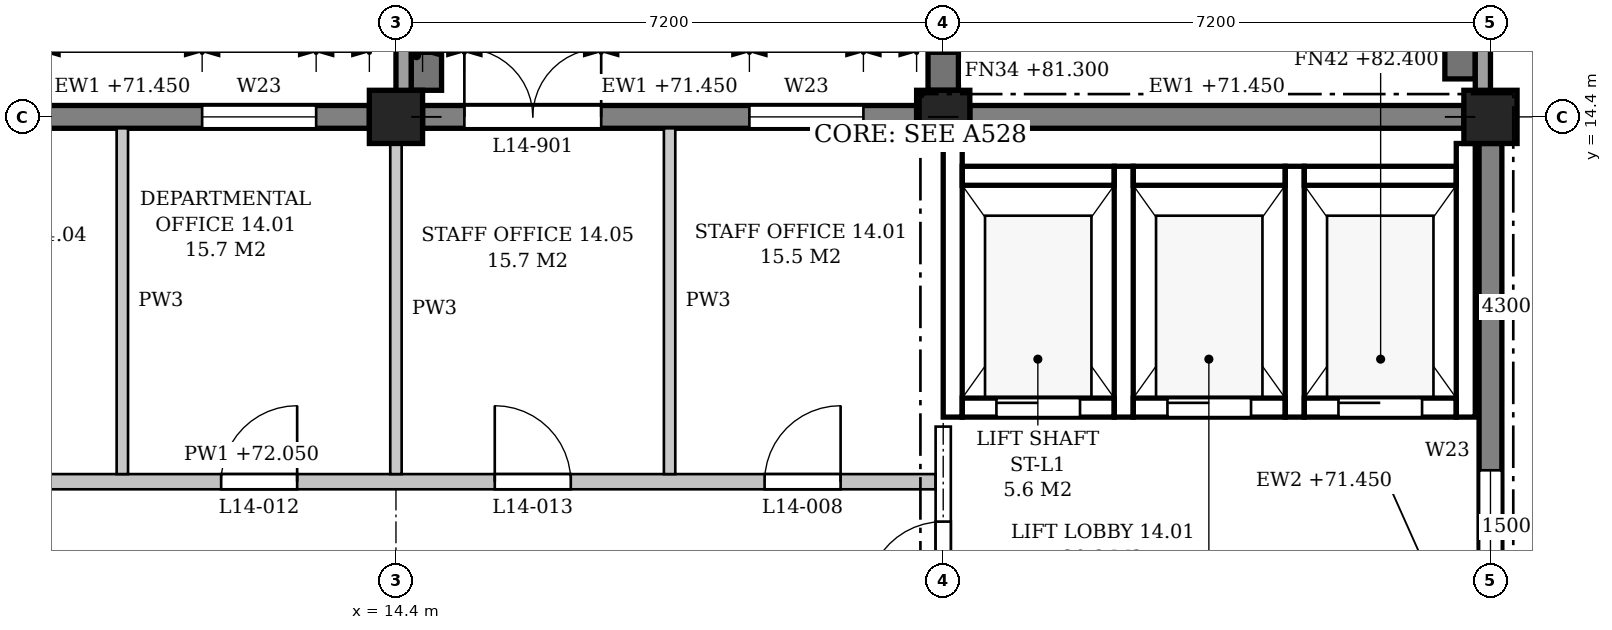
"""IFC4 building model, lengths in metres.
Left out: names, types, materials, properties, quantities, classifications, styles, units other than length and angle.
Written with IfcOpenShell. Run it as: python <this file> out.ifc"""

import sys

from ifc_helpers import new_model, si_unit, direction, frame, frame_2d, origin, origin_2d, place, context, subcontext, project, spatial, polyline, rectangle, outline, extrude, element, fill, save


model = new_model("IFC4")
c1 = context("Model", 3, precision=1e-05, world=origin(), true_north=direction((0.0, 1.0)))
c2 = subcontext(c1, "Body", "Model", "MODEL_VIEW")
j1 = project(units=[si_unit("LENGTHUNIT", "METRE"), si_unit("PLANEANGLEUNIT", "RADIAN")], contexts=[c1])
p1 = place(None, origin())
s1 = spatial("IfcSite", under=j1, at=p1, CompositionType="ELEMENT")
p2 = place(p1, origin())
s2 = spatial("IfcBuilding", under=s1, at=p2, CompositionType="ELEMENT")
p3 = place(p2, frame((0.0, 0.0, 67.8)))
s3 = spatial("IfcBuildingStorey", under=s2, at=p3, CompositionType="ELEMENT", Elevation=67.8)
for number, where, z_axis, x_axis in (
    (1, (14.4, 14.4, 0.0), (0.0, 0.0, 1.0), (1.0, 0.0, 0.0)),
    (2, (21.6, 14.4, 0.0), (0.0, 0.0, 1.0), (1.0, 0.0, 0.0)),
    (3, (28.8, 14.4, 0.0), (0.0, 0.0, 1.0), (1.0, 0.0, 0.0)),
):
    element("IfcColumn", number, at=place(p3, frame(where, z_axis=z_axis, x_axis=x_axis)), inside=s3, PredefinedType="COLUMN", context=c2, shape_type="SweptSolid", body=[
        extrude(rectangle(XDim=0.7, YDim=0.7, at=origin_2d()), origin(), (0.0, 0.0, 1.0), 4.5),
    ])
for number, where, z_axis, x_axis in (
    (4, (14.5, 14.55, 0.0), (0.0, 0.0, 1.0), (0.0, 1.0, 0.0)),
    (5, (28.7, 14.55, 0.0), (0.0, 0.0, 1.0), (0.0, 1.0, 0.0)),
):
    element("IfcWall", number, at=place(p3, frame(where, z_axis=z_axis, x_axis=x_axis)), inside=s3, PredefinedType="STANDARD", context=c2, shape_type="SweptSolid", body=[
        extrude(rectangle(XDim=7.05, YDim=0.2, at=frame_2d((3.525, 0.0))), origin(), (0.0, 0.0, 1.0), 0.15),
    ])
p4 = place(p3, frame((28.8, 7.55, 0.0), z_axis=(0.0, 0.0, 1.0), x_axis=(0.0, 1.0, 0.0)))
e6 = element("IfcWall", 6, at=p4, inside=s3, PredefinedType="STANDARD", context=c2, shape_type="SweptSolid", body=[
    extrude(rectangle(XDim=6.5, YDim=0.3, at=frame_2d((3.25, 0.0))), origin(), (0.0, 0.0, 1.0), 3.65),
])
p5 = place(p4, frame((0.7, 0.0, 0.9)))
e7 = element("IfcOpeningElement", 7, at=p5, cuts=e6, PredefinedType="OPENING", context=c2, shape_type="SweptSolid", body=[
    extrude(outline(polyline([(0.0, 0.0), (1.5, 0.0), (1.5, 1.95), (0.75, 2.7), (0.0, 1.95), (0.0, 0.0)])), frame((0.0, 0.16, 0.0), z_axis=(0.0, -1.0, 0.0), x_axis=(1.0, 0.0, 0.0)), (0.0, 0.0, 1.0), 0.32),
])
p6 = place(p3, frame((28.45, 14.4, 0.0), z_axis=(0.0, 0.0, 1.0), x_axis=(-1.0, 0.0, 0.0)))
e8 = element("IfcWall", 8, at=p6, inside=s3, PredefinedType="STANDARD", context=c2, shape_type="SweptSolid", body=[
    extrude(rectangle(XDim=6.5, YDim=0.3, at=frame_2d((3.25, 0.0))), origin(), (0.0, 0.0, 1.0), 3.65),
])
p7 = place(p3, frame((21.25, 14.4, 0.0), z_axis=(0.0, 0.0, 1.0), x_axis=(-1.0, 0.0, 0.0)))
e9 = element("IfcWall", 9, at=p7, inside=s3, PredefinedType="STANDARD", context=c2, shape_type="SweptSolid", body=[
    extrude(rectangle(XDim=6.5, YDim=0.3, at=frame_2d((3.25, 0.0))), origin(), (0.0, 0.0, 1.0), 3.65),
])
p8 = place(p7, frame((4.15, 0.0, 0.0)))
e10 = element("IfcOpeningElement", 10, at=p8, cuts=e9, PredefinedType="OPENING", context=c2, shape_type="SweptSolid", body=[
    extrude(rectangle(XDim=1.8, YDim=2.4, at=frame_2d((0.9, 1.2))), frame((0.0, 0.16, 0.0), z_axis=(0.0, -1.0, 0.0), x_axis=(1.0, 0.0, 0.0)), (0.0, 0.0, 1.0), 0.32),
])
p9 = place(p7, frame((0.7, 0.0, 0.9)))
e11 = element("IfcOpeningElement", 11, at=p9, cuts=e9, PredefinedType="OPENING", context=c2, shape_type="SweptSolid", body=[
    extrude(outline(polyline([(0.0, 0.0), (1.5, 0.0), (1.5, 1.95), (0.75, 2.7), (0.0, 1.95), (0.0, 0.0)])), frame((0.0, 0.16, 0.0), z_axis=(0.0, -1.0, 0.0), x_axis=(1.0, 0.0, 0.0)), (0.0, 0.0, 1.0), 0.32),
])
p10 = place(p3, frame((14.05, 14.4, 0.0), z_axis=(0.0, 0.0, 1.0), x_axis=(-1.0, 0.0, 0.0)))
e12 = element("IfcWall", 12, at=p10, inside=s3, PredefinedType="STANDARD", context=c2, shape_type="SweptSolid", body=[
    extrude(rectangle(XDim=6.5, YDim=0.3, at=frame_2d((3.25, 0.0))), origin(), (0.0, 0.0, 1.0), 3.65),
])
p11 = place(p10, frame((0.7, 0.0, 0.9)))
e13 = element("IfcOpeningElement", 13, at=p11, cuts=e12, PredefinedType="OPENING", context=c2, shape_type="SweptSolid", body=[
    extrude(outline(polyline([(0.0, 0.0), (1.5, 0.0), (1.5, 1.95), (0.75, 2.7), (0.0, 1.95), (0.0, 0.0)])), frame((0.0, 0.16, 0.0), z_axis=(0.0, -1.0, 0.0), x_axis=(1.0, 0.0, 0.0)), (0.0, 0.0, 1.0), 0.32),
])
p12 = place(p10, frame((4.3, 0.0, 0.9)))
e14 = element("IfcOpeningElement", 14, at=p12, cuts=e12, PredefinedType="OPENING", context=c2, shape_type="SweptSolid", body=[
    extrude(outline(polyline([(0.0, 0.0), (1.5, 0.0), (1.5, 1.95), (0.75, 2.7), (0.0, 1.95), (0.0, 0.0)])), frame((0.0, 0.16, 0.0), z_axis=(0.0, -1.0, 0.0), x_axis=(1.0, 0.0, 0.0)), (0.0, 0.0, 1.0), 0.32),
])
for number, where, z_axis, x_axis in (
    (15, (14.8, 14.75, 0.0), (0.0, 0.0, 1.0), (0.0, 1.0, 0.0)),
    (16, (21.6, 14.75, 0.0), (0.0, 0.0, 1.0), (0.0, 1.0, 0.0)),
):
    element("IfcWall", number, at=place(p3, frame(where, z_axis=z_axis, x_axis=x_axis)), inside=s3, PredefinedType="POLYGONAL", context=c2, shape_type="SweptSolid", body=[
        extrude(outline(polyline([(0.5, 0.0), (0.5, 12.975), (0.15, 13.5), (0.0, 13.5), (0.0, 0.0), (0.5, 0.0)])), frame((0.0, 0.2, 0.0), z_axis=(0.0, -1.0, 0.0), x_axis=(1.0, 0.0, 0.0)), (0.0, 0.0, 1.0), 0.4),
    ])
p13 = place(p3, frame((28.4, 14.9, 0.0), z_axis=(0.0, 0.0, 1.0), x_axis=(0.0, 1.0, 0.0)))
e17 = element("IfcWall", 17, at=p13, inside=s3, PredefinedType="POLYGONAL", context=c2, shape_type="SweptSolid", body=[
    extrude(outline(polyline([(0.5, 0.0), (0.5, 14.6), (0.0, 14.6), (0.0, 0.0), (0.5, 0.0)])), frame((0.0, 0.2, 0.0), z_axis=(0.0, -1.0, 0.0), x_axis=(1.0, 0.0, 0.0)), (0.0, 0.0, 1.0), 0.4),
])
p14 = place(p3, frame((21.725, 10.45, -0.25), z_axis=(0.0, 0.0, 1.0), x_axis=(0.0, 1.0, 0.0)))
e18 = element("IfcWall", 18, at=p14, inside=s3, PredefinedType="SHEAR", context=c2, shape_type="SweptSolid", body=[
    extrude(rectangle(XDim=3.6, YDim=0.25, at=frame_2d((1.8, 0.0))), origin(), (0.0, 0.0, 1.0), 3.85),
])
for number, where, z_axis, x_axis in (
    (19, (23.975, 10.45, -0.25), (0.0, 0.0, 1.0), (0.0, 1.0, 0.0)),
    (20, (26.225, 10.45, -0.25), (0.0, 0.0, 1.0), (0.0, 1.0, 0.0)),
):
    element("IfcWall", number, at=place(p3, frame(where, z_axis=z_axis, x_axis=x_axis)), inside=s3, PredefinedType="SHEAR", context=c2, shape_type="SweptSolid", body=[
        extrude(rectangle(XDim=3.3, YDim=0.25, at=frame_2d((1.65, 0.0))), origin(), (0.0, 0.0, 1.0), 4.5),
    ])
p15 = place(p3, frame((28.475, 10.45, -0.25), z_axis=(0.0, 0.0, 1.0), x_axis=(0.0, 1.0, 0.0)))
e21 = element("IfcWall", 21, at=p15, inside=s3, PredefinedType="SHEAR", context=c2, shape_type="SweptSolid", body=[
    extrude(rectangle(XDim=3.6, YDim=0.25, at=frame_2d((1.8, 0.0))), origin(), (0.0, 0.0, 1.0), 4.5),
])
p16 = place(p3, frame((21.85, 10.575, -0.25), z_axis=(0.0, 0.0, 1.0), x_axis=(1.0, 0.0, 0.0)))
e22 = element("IfcWall", 22, at=p16, inside=s3, PredefinedType="SHEAR", context=c2, shape_type="SweptSolid", body=[
    extrude(rectangle(XDim=2.0, YDim=0.25, at=frame_2d((1.0, 0.0))), origin(), (0.0, 0.0, 1.0), 4.5),
])
p17 = place(p16, frame((0.45, 0.0, 0.25)))
e23 = element("IfcOpeningElement", 23, at=p17, cuts=e22, PredefinedType="OPENING", context=c2, shape_type="SweptSolid", body=[
    extrude(rectangle(XDim=1.1, YDim=2.1, at=frame_2d((0.55, 1.05))), frame((0.0, 0.135, 0.0), z_axis=(0.0, -1.0, 0.0), x_axis=(1.0, 0.0, 0.0)), (0.0, 0.0, 1.0), 0.27),
])
p18 = place(p3, frame((21.85, 13.625, -0.25), z_axis=(0.0, 0.0, 1.0), x_axis=(1.0, 0.0, 0.0)))
e24 = element("IfcWall", 24, at=p18, inside=s3, PredefinedType="SHEAR", context=c2, shape_type="SweptSolid", body=[
    extrude(rectangle(XDim=2.0, YDim=0.25, at=frame_2d((1.0, 0.0))), origin(), (0.0, 0.0, 1.0), 4.5),
])
p19 = place(p3, frame((24.1, 10.575, -0.25), z_axis=(0.0, 0.0, 1.0), x_axis=(1.0, 0.0, 0.0)))
e25 = element("IfcWall", 25, at=p19, inside=s3, PredefinedType="SHEAR", context=c2, shape_type="SweptSolid", body=[
    extrude(rectangle(XDim=2.0, YDim=0.25, at=frame_2d((1.0, 0.0))), origin(), (0.0, 0.0, 1.0), 4.5),
])
p20 = place(p19, frame((0.45, 0.0, 0.25)))
e26 = element("IfcOpeningElement", 26, at=p20, cuts=e25, PredefinedType="OPENING", context=c2, shape_type="SweptSolid", body=[
    extrude(rectangle(XDim=1.1, YDim=2.1, at=frame_2d((0.55, 1.05))), frame((0.0, 0.135, 0.0), z_axis=(0.0, -1.0, 0.0), x_axis=(1.0, 0.0, 0.0)), (0.0, 0.0, 1.0), 0.27),
])
p21 = place(p3, frame((24.1, 13.625, -0.25), z_axis=(0.0, 0.0, 1.0), x_axis=(1.0, 0.0, 0.0)))
e27 = element("IfcWall", 27, at=p21, inside=s3, PredefinedType="SHEAR", context=c2, shape_type="SweptSolid", body=[
    extrude(rectangle(XDim=2.0, YDim=0.25, at=frame_2d((1.0, 0.0))), origin(), (0.0, 0.0, 1.0), 4.5),
])
p22 = place(p3, frame((26.35, 10.575, -0.25), z_axis=(0.0, 0.0, 1.0), x_axis=(1.0, 0.0, 0.0)))
e28 = element("IfcWall", 28, at=p22, inside=s3, PredefinedType="SHEAR", context=c2, shape_type="SweptSolid", body=[
    extrude(rectangle(XDim=2.0, YDim=0.25, at=frame_2d((1.0, 0.0))), origin(), (0.0, 0.0, 1.0), 4.5),
])
p23 = place(p22, frame((0.45, 0.0, 0.25)))
e29 = element("IfcOpeningElement", 29, at=p23, cuts=e28, PredefinedType="OPENING", context=c2, shape_type="SweptSolid", body=[
    extrude(rectangle(XDim=1.1, YDim=2.1, at=frame_2d((0.55, 1.05))), frame((0.0, 0.135, 0.0), z_axis=(0.0, -1.0, 0.0), x_axis=(1.0, 0.0, 0.0)), (0.0, 0.0, 1.0), 0.27),
])
p24 = place(p3, frame((26.35, 13.625, -0.25), z_axis=(0.0, 0.0, 1.0), x_axis=(1.0, 0.0, 0.0)))
e30 = element("IfcWall", 30, at=p24, inside=s3, PredefinedType="SHEAR", context=c2, shape_type="SweptSolid", body=[
    extrude(rectangle(XDim=2.0, YDim=0.25, at=frame_2d((1.0, 0.0))), origin(), (0.0, 0.0, 1.0), 4.5),
])
p25 = place(p3, frame((3.5, 9.6, 0.0), z_axis=(0.0, 0.0, 1.0), x_axis=(1.0, 0.0, 0.0)))
e31 = element("IfcWall", 31, at=p25, inside=s3, PredefinedType="PARTITIONING", context=c2, shape_type="SweptSolid", body=[
    extrude(outline(polyline([(0.0, 0.0), (18.0, 0.0), (18.0, 3.6), (17.9, 3.6), (17.9, 4.25), (11.1, 4.25), (11.1, 3.6), (10.7, 3.6), (10.7, 4.25), (3.9, 4.25), (3.9, 3.6), (3.5, 3.6), (3.5, 4.25), (0.0, 4.25), (0.0, 0.0)])), frame((0.0, 0.1, 0.0), z_axis=(0.0, -1.0, 0.0), x_axis=(1.0, 0.0, 0.0)), (0.0, 0.0, 1.0), 0.2),
])
p26 = place(p25, frame((15.75, 0.0, 0.0)))
e32 = element("IfcOpeningElement", 32, at=p26, cuts=e31, PredefinedType="OPENING", context=c2, shape_type="SweptSolid", body=[
    extrude(rectangle(XDim=1.0, YDim=2.1, at=frame_2d((0.5, 1.05))), frame((0.0, 0.11, 0.0), z_axis=(0.0, -1.0, 0.0), x_axis=(1.0, 0.0, 0.0)), (0.0, 0.0, 1.0), 0.22),
])
p27 = place(p25, frame((1.4, 0.0, 0.0)))
e33 = element("IfcOpeningElement", 33, at=p27, cuts=e31, PredefinedType="OPENING", context=c2, shape_type="SweptSolid", body=[
    extrude(rectangle(XDim=1.0, YDim=2.1, at=frame_2d((0.5, 1.05))), frame((0.0, 0.11, 0.0), z_axis=(0.0, -1.0, 0.0), x_axis=(1.0, 0.0, 0.0)), (0.0, 0.0, 1.0), 0.22),
])
p28 = place(p25, frame((5.0, 0.0, 0.0)))
e34 = element("IfcOpeningElement", 34, at=p28, cuts=e31, PredefinedType="OPENING", context=c2, shape_type="SweptSolid", body=[
    extrude(rectangle(XDim=1.0, YDim=2.1, at=frame_2d((0.5, 1.05))), frame((0.0, 0.11, 0.0), z_axis=(0.0, -1.0, 0.0), x_axis=(1.0, 0.0, 0.0)), (0.0, 0.0, 1.0), 0.22),
])
p29 = place(p25, frame((8.6, 0.0, 0.0)))
e35 = element("IfcOpeningElement", 35, at=p29, cuts=e31, PredefinedType="OPENING", context=c2, shape_type="SweptSolid", body=[
    extrude(rectangle(XDim=1.0, YDim=2.1, at=frame_2d((0.5, 1.05))), frame((0.0, 0.11, 0.0), z_axis=(0.0, -1.0, 0.0), x_axis=(1.0, 0.0, 0.0)), (0.0, 0.0, 1.0), 0.22),
])
p30 = place(p25, frame((12.2, 0.0, 0.0)))
e36 = element("IfcOpeningElement", 36, at=p30, cuts=e31, PredefinedType="OPENING", context=c2, shape_type="SweptSolid", body=[
    extrude(rectangle(XDim=1.0, YDim=2.1, at=frame_2d((0.5, 1.05))), frame((0.0, 0.11, 0.0), z_axis=(0.0, -1.0, 0.0), x_axis=(1.0, 0.0, 0.0)), (0.0, 0.0, 1.0), 0.22),
])
p31 = place(p3, frame((10.8, 9.7, 0.0), z_axis=(0.0, 0.0, 1.0), x_axis=(0.0, 1.0, 0.0)))
e37 = element("IfcWall", 37, at=p31, inside=s3, PredefinedType="PARTITIONING", context=c2, shape_type="SweptSolid", body=[
    extrude(rectangle(XDim=4.55, YDim=0.15, at=frame_2d((2.275, 0.0))), origin(), (0.0, 0.0, 1.0), 3.6),
])
p32 = place(p3, frame((14.4, 9.7, 0.0), z_axis=(0.0, 0.0, 1.0), x_axis=(0.0, 1.0, 0.0)))
e38 = element("IfcWall", 38, at=p32, inside=s3, PredefinedType="PARTITIONING", context=c2, shape_type="SweptSolid", body=[
    extrude(rectangle(XDim=4.35, YDim=0.15, at=frame_2d((2.175, 0.0))), origin(), (0.0, 0.0, 1.0), 3.6),
])
p33 = place(p3, frame((18.0, 9.7, 0.0), z_axis=(0.0, 0.0, 1.0), x_axis=(0.0, 1.0, 0.0)))
e39 = element("IfcWall", 39, at=p33, inside=s3, PredefinedType="PARTITIONING", context=c2, shape_type="SweptSolid", body=[
    extrude(rectangle(XDim=4.55, YDim=0.15, at=frame_2d((2.275, 0.0))), origin(), (0.0, 0.0, 1.0), 3.6),
])
p34 = place(p3, frame((21.6, 7.55, 0.0), z_axis=(0.0, 0.0, 1.0), x_axis=(0.0, 1.0, 0.0)))
e40 = element("IfcWall", 40, at=p34, inside=s3, PredefinedType="PARTITIONING", context=c2, shape_type="SweptSolid", body=[
    extrude(rectangle(XDim=2.775, YDim=0.2, at=frame_2d((1.387, 0.0))), origin(), (0.0, 0.0, 1.0), 3.6),
])
p35 = place(p34, frame((0.525, 0.0, 0.0)))
e41 = element("IfcOpeningElement", 41, at=p35, cuts=e40, PredefinedType="OPENING", context=c2, shape_type="SweptSolid", body=[
    extrude(rectangle(XDim=1.0, YDim=2.1, at=frame_2d((0.5, 1.05))), frame((0.0, 0.11, 0.0), z_axis=(0.0, -1.0, 0.0), x_axis=(1.0, 0.0, 0.0)), (0.0, 0.0, 1.0), 0.22),
])
p36 = place(p8, frame((1.8, 0.0, 0.0), z_axis=(0.0, 0.0, 1.0), x_axis=(-1.0, 0.0, 0.0)))
e42 = element("IfcDoor", 42, at=p36, inside=s3, OperationType="DOUBLE_DOOR_SINGLE_SWING", PredefinedType="DOOR", context=c2, shape_type="SweptSolid", body=[
    extrude(rectangle(XDim=1.8, YDim=2.4, at=frame_2d((0.9, 1.2))), frame((0.0, 0.025, 0.0), z_axis=(0.0, -1.0, 0.0), x_axis=(1.0, 0.0, 0.0)), (0.0, 0.0, 1.0), 0.05),
])
fill(e10, e42)
p37 = place(p5, origin())
e43 = element("IfcWindow", 43, at=p37, inside=s3, PartitioningType="SINGLE_PANEL", PredefinedType="WINDOW", context=c2, shape_type="SweptSolid", body=[
    extrude(outline(polyline([(0.0, 0.0), (1.5, 0.0), (1.5, 1.95), (0.75, 2.7), (0.0, 1.95), (0.0, 0.0)])), frame((0.0, 0.03, 0.0), z_axis=(0.0, -1.0, 0.0), x_axis=(1.0, 0.0, 0.0)), (0.0, 0.0, 1.0), 0.06),
])
fill(e7, e43)
p38 = place(p9, origin())
e44 = element("IfcWindow", 44, at=p38, inside=s3, PartitioningType="SINGLE_PANEL", PredefinedType="WINDOW", context=c2, shape_type="SweptSolid", body=[
    extrude(outline(polyline([(0.0, 0.0), (1.5, 0.0), (1.5, 1.95), (0.75, 2.7), (0.0, 1.95), (0.0, 0.0)])), frame((0.0, 0.03, 0.0), z_axis=(0.0, -1.0, 0.0), x_axis=(1.0, 0.0, 0.0)), (0.0, 0.0, 1.0), 0.06),
])
fill(e11, e44)
p39 = place(p11, origin())
e45 = element("IfcWindow", 45, at=p39, inside=s3, PartitioningType="SINGLE_PANEL", PredefinedType="WINDOW", context=c2, shape_type="SweptSolid", body=[
    extrude(outline(polyline([(0.0, 0.0), (1.5, 0.0), (1.5, 1.95), (0.75, 2.7), (0.0, 1.95), (0.0, 0.0)])), frame((0.0, 0.03, 0.0), z_axis=(0.0, -1.0, 0.0), x_axis=(1.0, 0.0, 0.0)), (0.0, 0.0, 1.0), 0.06),
])
fill(e13, e45)
p40 = place(p17, origin())
e46 = element("IfcDoor", 46, at=p40, inside=s3, OperationType="SLIDING_TO_LEFT", PredefinedType="DOOR", context=c2, shape_type="SweptSolid", body=[
    extrude(rectangle(XDim=1.1, YDim=2.1, at=frame_2d((0.55, 1.05))), frame((0.0, 0.025, 0.0), z_axis=(0.0, -1.0, 0.0), x_axis=(1.0, 0.0, 0.0)), (0.0, 0.0, 1.0), 0.05),
])
fill(e23, e46)
p41 = place(p20, origin())
e47 = element("IfcDoor", 47, at=p41, inside=s3, OperationType="SLIDING_TO_LEFT", PredefinedType="DOOR", context=c2, shape_type="SweptSolid", body=[
    extrude(rectangle(XDim=1.1, YDim=2.1, at=frame_2d((0.55, 1.05))), frame((0.0, 0.025, 0.0), z_axis=(0.0, -1.0, 0.0), x_axis=(1.0, 0.0, 0.0)), (0.0, 0.0, 1.0), 0.05),
])
fill(e26, e47)
p42 = place(p23, origin())
e48 = element("IfcDoor", 48, at=p42, inside=s3, OperationType="SLIDING_TO_LEFT", PredefinedType="DOOR", context=c2, shape_type="SweptSolid", body=[
    extrude(rectangle(XDim=1.1, YDim=2.1, at=frame_2d((0.55, 1.05))), frame((0.0, 0.025, 0.0), z_axis=(0.0, -1.0, 0.0), x_axis=(1.0, 0.0, 0.0)), (0.0, 0.0, 1.0), 0.05),
])
fill(e29, e48)
p43 = place(p35, origin())
e49 = element("IfcDoor", 49, at=p43, inside=s3, OperationType="SINGLE_SWING_LEFT", PredefinedType="DOOR", context=c2, shape_type="SweptSolid", body=[
    extrude(rectangle(XDim=1.0, YDim=2.1, at=frame_2d((0.5, 1.05))), frame((0.0, 0.025, 0.0), z_axis=(0.0, -1.0, 0.0), x_axis=(1.0, 0.0, 0.0)), (0.0, 0.0, 1.0), 0.05),
])
fill(e41, e49)
p44 = place(p26, origin())
e50 = element("IfcDoor", 50, at=p44, inside=s3, OperationType="SINGLE_SWING_RIGHT", PredefinedType="DOOR", context=c2, shape_type="SweptSolid", body=[
    extrude(rectangle(XDim=1.0, YDim=2.1, at=frame_2d((0.5, 1.05))), frame((0.0, 0.025, 0.0), z_axis=(0.0, -1.0, 0.0), x_axis=(1.0, 0.0, 0.0)), (0.0, 0.0, 1.0), 0.05),
])
fill(e32, e50)
p45 = place(p29, origin())
e51 = element("IfcDoor", 51, at=p45, inside=s3, OperationType="SINGLE_SWING_RIGHT", PredefinedType="DOOR", context=c2, shape_type="SweptSolid", body=[
    extrude(rectangle(XDim=1.0, YDim=2.1, at=frame_2d((0.5, 1.05))), frame((0.0, 0.025, 0.0), z_axis=(0.0, -1.0, 0.0), x_axis=(1.0, 0.0, 0.0)), (0.0, 0.0, 1.0), 0.05),
])
fill(e35, e51)
p46 = place(p30, origin())
e52 = element("IfcDoor", 52, at=p46, inside=s3, OperationType="SINGLE_SWING_LEFT", PredefinedType="DOOR", context=c2, shape_type="SweptSolid", body=[
    extrude(rectangle(XDim=1.0, YDim=2.1, at=frame_2d((0.5, 1.05))), frame((0.0, 0.025, 0.0), z_axis=(0.0, -1.0, 0.0), x_axis=(1.0, 0.0, 0.0)), (0.0, 0.0, 1.0), 0.05),
])
fill(e36, e52)
save(model, sys.argv[1])
